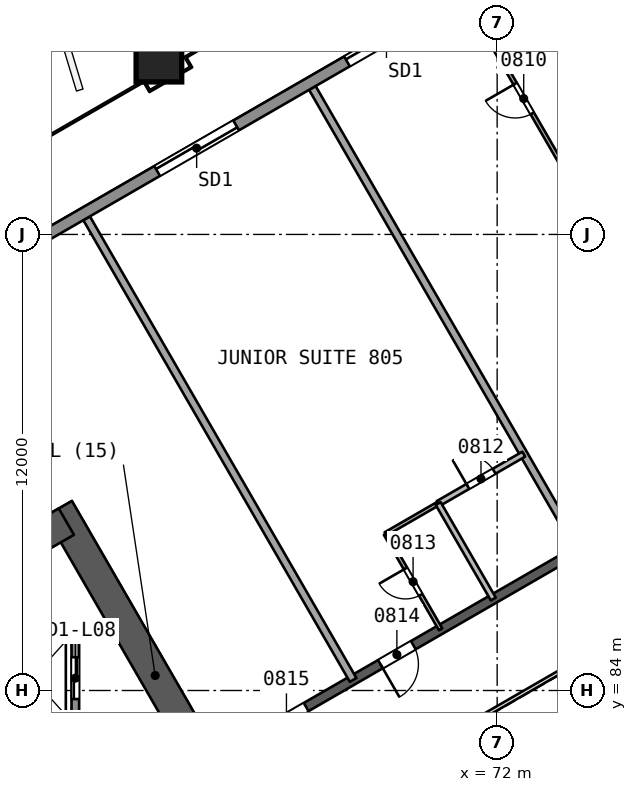
"""IFC4 building model, lengths in metres.
Left out: names, types, materials, properties, quantities, classifications, styles, units other than length and angle.
Written with IfcOpenShell. Run it as: python <this file> out.ifc"""

import sys

from ifc_helpers import new_model, si_unit, direction, frame, frame_2d, origin, origin_2d, place, context, subcontext, project, spatial, rectangle, extrude, element, fill, save


model = new_model("IFC4")
c1 = context("Model", 3, precision=1e-05, world=origin(), true_north=direction((0.0, 1.0)))
c2 = subcontext(c1, "Body", "Model", "MODEL_VIEW")
j1 = project(units=[si_unit("LENGTHUNIT", "METRE"), si_unit("PLANEANGLEUNIT", "RADIAN")], contexts=[c1])
p1 = place(None, origin())
s1 = spatial("IfcSite", under=j1, at=p1, CompositionType="ELEMENT")
p2 = place(p1, origin())
s2 = spatial("IfcBuilding", under=s1, at=p2, CompositionType="ELEMENT")
p3 = place(p2, frame((0.0, 0.0, 41.1)))
s3 = spatial("IfcBuildingStorey", under=s2, at=p3, CompositionType="ELEMENT", Elevation=41.1)
p4 = place(p3, frame((65.538, 80.0, 0.0), z_axis=(0.0, 0.0, 1.0), x_axis=(-0.49999662545, 0.866027352073, 0.0)))
e1 = element("IfcWall", 1, at=p4, inside=s3, PredefinedType="SHEAR", context=c2, shape_type="SweptSolid", body=[
    extrude(rectangle(XDim=10.149, YDim=0.8, at=frame_2d((5.074, 0.0))), origin(), (0.0, 0.0, 1.0), 3.7),
])
p5 = place(p4, frame((0.719, 0.0, 0.0)))
e2 = element("IfcOpeningElement", 2, at=p5, cuts=e1, PredefinedType="OPENING", context=c2, shape_type="SweptSolid", body=[
    extrude(rectangle(XDim=1.2, YDim=2.1, at=frame_2d((0.6, 1.05))), frame((0.0, 0.411, 0.0), z_axis=(0.0, -1.0, 0.0), x_axis=(1.0, 0.0, 0.0)), (0.0, 0.0, 1.0), 0.821),
])
p6 = place(p3, frame((60.664, 88.443, 0.0), z_axis=(0.0, 0.0, 1.0), x_axis=(-0.866029478545, -0.499992942241, 0.0)))
e3 = element("IfcWall", 3, at=p6, inside=s3, PredefinedType="SHEAR", context=c2, shape_type="SweptSolid", body=[
    extrude(rectangle(XDim=13.933, YDim=0.8, at=frame_2d((6.967, 0.0))), origin(), (0.0, 0.0, 1.0), 3.7),
])
p7 = place(p3, frame((78.2, 90.046, 0.0), z_axis=(0.0, 0.0, 1.0), x_axis=(-0.866026492143, -0.499998114903, 0.0)))
e4 = element("IfcWall", 4, at=p7, inside=s3, PredefinedType="SHEAR", context=c2, shape_type="SweptSolid", body=[
    extrude(rectangle(XDim=15.588, YDim=0.25, at=frame_2d((7.794, 0.0))), origin(), (0.0, 0.0, 1.0), 3.2),
])
p8 = place(p7, frame((1.838, 0.0, 0.0)))
e5 = element("IfcOpeningElement", 5, at=p8, cuts=e4, PredefinedType="OPENING", context=c2, shape_type="SweptSolid", body=[
    extrude(rectangle(XDim=1.0, YDim=2.1, at=frame_2d((0.5, 1.05))), frame((0.0, 0.135, 0.0), z_axis=(0.0, -1.0, 0.0), x_axis=(1.0, 0.0, 0.0)), (0.0, 0.0, 1.0), 0.271),
])
p9 = place(p7, frame((9.706, 0.0, 0.0)))
e6 = element("IfcOpeningElement", 6, at=p9, cuts=e4, PredefinedType="OPENING", context=c2, shape_type="SweptSolid", body=[
    extrude(rectangle(XDim=1.0, YDim=2.1, at=frame_2d((0.5, 1.05))), frame((0.0, 0.135, 0.0), z_axis=(0.0, -1.0, 0.0), x_axis=(1.0, 0.0, 0.0)), (0.0, 0.0, 1.0), 0.271),
])
p10 = place(p7, frame((12.962, 0.0, 0.0)))
e7 = element("IfcOpeningElement", 7, at=p10, cuts=e4, PredefinedType="OPENING", context=c2, shape_type="SweptSolid", body=[
    extrude(rectangle(XDim=1.2, YDim=2.4, at=frame_2d((0.6, 1.2))), frame((0.0, 0.135, 0.0), z_axis=(0.0, -1.0, 0.0), x_axis=(1.0, 0.0, 0.0)), (0.0, 0.0, 1.0), 0.271),
])
p11 = place(p3, frame((63.087, 100.634, 0.0), z_axis=(0.010093620709, -0.017482414954, 0.999796221231), x_axis=(0.866020200589, 0.50000901209, 8.5616e-08)))
e8 = element("IfcColumn", 8, at=p11, inside=s3, PredefinedType="COLUMN", context=c2, shape_type="SweptSolid", body=[
    extrude(rectangle(XDim=1.2, YDim=1.2, at=origin_2d()), origin(), (0.0, 0.0, 1.0), 3.701),
])
p12 = place(p3, frame((74.21, 96.956, 0.0), z_axis=(0.0, 0.0, 1.0), x_axis=(-0.499985689571, 0.866033665757, 0.0)))
e9 = element("IfcWall", 9, at=p12, inside=s3, PredefinedType="PARTITIONING", context=c2, shape_type="SweptSolid", body=[
    extrude(rectangle(XDim=6.048, YDim=0.1, at=frame_2d((3.024, 0.0))), origin(), (0.0, 0.0, 1.0), 3.2),
])
p13 = place(p12, frame((2.574, 0.0, 0.0)))
e10 = element("IfcOpeningElement", 10, at=p13, cuts=e9, PredefinedType="OPENING", context=c2, shape_type="SweptSolid", body=[
    extrude(rectangle(XDim=0.9, YDim=2.1, at=frame_2d((0.45, 1.05))), frame((0.0, 0.061, 0.0), z_axis=(0.0, -1.0, 0.0), x_axis=(1.0, 0.0, 0.0)), (0.0, 0.0, 1.0), 0.121),
])
p14 = place(p3, frame((67.136, 99.855, 0.0), z_axis=(0.0, 0.0, 1.0), x_axis=(0.499997162821, -0.866027041824, 0.0)))
e11 = element("IfcWall", 11, at=p14, inside=s3, PredefinedType="PARTITIONING", context=c2, shape_type="SweptSolid", body=[
    extrude(rectangle(XDim=14.027, YDim=0.2, at=frame_2d((7.013, 0.0))), origin(), (0.0, 0.0, 1.0), 3.2),
])
p15 = place(p3, frame((70.448, 88.919, 0.0), z_axis=(0.0, 0.0, 1.0), x_axis=(0.866062058628, 0.499936506574, 0.0)))
e12 = element("IfcWall", 12, at=p15, inside=s3, PredefinedType="PARTITIONING", context=c2, shape_type="SweptSolid", body=[
    extrude(rectangle(XDim=2.6, YDim=0.15, at=frame_2d((1.3, 0.0))), origin(), (0.0, 0.0, 1.0), 3.2),
])
p16 = place(p15, frame((0.9, 0.0, 0.0)))
e13 = element("IfcOpeningElement", 13, at=p16, cuts=e12, PredefinedType="OPENING", context=c2, shape_type="SweptSolid", body=[
    extrude(rectangle(XDim=0.8, YDim=2.1, at=frame_2d((0.4, 1.05))), frame((0.0, 0.085, 0.0), z_axis=(0.0, -1.0, 0.0), x_axis=(1.0, 0.0, 0.0)), (0.0, 0.0, 1.0), 0.171),
])
p17 = place(p3, frame((70.513, 85.608, 0.0), z_axis=(0.0, 0.0, 1.0), x_axis=(-0.499987231761, 0.866032775405, 0.0)))
e14 = element("IfcWall", 14, at=p17, inside=s3, PredefinedType="PARTITIONING", context=c2, shape_type="SweptSolid", body=[
    extrude(rectangle(XDim=2.9, YDim=0.1, at=frame_2d((1.45, 0.0))), origin(), (0.0, 0.0, 1.0), 3.2),
])
p18 = place(p17, frame((1.05, 0.0, 0.0)))
e15 = element("IfcOpeningElement", 15, at=p18, cuts=e14, PredefinedType="OPENING", context=c2, shape_type="SweptSolid", body=[
    extrude(rectangle(XDim=0.8, YDim=2.1, at=frame_2d((0.4, 1.05))), frame((0.0, 0.061, 0.0), z_axis=(0.0, -1.0, 0.0), x_axis=(1.0, 0.0, 0.0)), (0.0, 0.0, 1.0), 0.121),
])
p19 = place(p3, frame((69.063, 88.119, 0.0), z_axis=(0.0, 0.0, 1.0), x_axis=(0.865989903783, 0.500061482766, 0.0)))
e16 = element("IfcWall", 16, at=p19, inside=s3, PredefinedType="PARTITIONING", context=c2, shape_type="SweptSolid", body=[
    extrude(rectangle(XDim=1.6, YDim=0.1, at=frame_2d((0.8, 0.0))), origin(), (0.0, 0.0, 1.0), 3.2),
])
p20 = place(p3, frame((61.197, 96.426, 0.0), z_axis=(0.0, 0.0, 1.0), x_axis=(0.499997162821, -0.866027041824, 0.0)))
e17 = element("IfcWall", 17, at=p20, inside=s3, PredefinedType="PARTITIONING", context=c2, shape_type="SweptSolid", body=[
    extrude(rectangle(XDim=14.027, YDim=0.2, at=frame_2d((7.013, 0.0))), origin(), (0.0, 0.0, 1.0), 3.2),
])
p21 = place(p3, frame((70.448, 88.919, 0.0), z_axis=(0.0, 0.0, 1.0), x_axis=(0.50005036918, -0.865996321171, 0.0)))
e18 = element("IfcWall", 18, at=p21, inside=s3, PredefinedType="PARTITIONING", context=c2, shape_type="SweptSolid", body=[
    extrude(rectangle(XDim=2.9, YDim=0.15, at=frame_2d((1.45, 0.0))), origin(), (0.0, 0.0, 1.0), 3.2),
])
p22 = place(p3, frame((37.87, 83.13, 0.0), z_axis=(0.0, 0.0, 1.0), x_axis=(0.866026630825, 0.499997874697, 0.0)))
e19 = element("IfcWall", 19, at=p22, inside=s3, PredefinedType="SOLIDWALL", context=c2, shape_type="SweptSolid", body=[
    extrude(rectangle(XDim=61.18, YDim=0.3, at=frame_2d((30.59, 0.0))), origin(), (0.0, 0.0, 1.0), 3.2),
])
p23 = place(p22, frame((12.181, 0.0, 0.0)))
e20 = element("IfcOpeningElement", 20, at=p23, cuts=e19, PredefinedType="OPENING", context=c2, shape_type="SweptSolid", body=[
    extrude(rectangle(XDim=2.4, YDim=2.4, at=frame_2d((1.2, 1.2))), frame((0.0, 0.161, 0.0), z_axis=(0.0, -1.0, 0.0), x_axis=(1.0, 0.0, 0.0)), (0.0, 0.0, 1.0), 0.321),
])
p24 = place(p22, frame((34.846, 0.0, 0.0)))
e21 = element("IfcOpeningElement", 21, at=p24, cuts=e19, PredefinedType="OPENING", context=c2, shape_type="SweptSolid", body=[
    extrude(rectangle(XDim=2.4, YDim=2.4, at=frame_2d((1.2, 1.2))), frame((0.0, 0.161, 0.0), z_axis=(0.0, -1.0, 0.0), x_axis=(1.0, 0.0, 0.0)), (0.0, 0.0, 1.0), 0.321),
])
p25 = place(p22, frame((47.439, 0.0, 0.0)))
e22 = element("IfcOpeningElement", 22, at=p25, cuts=e19, PredefinedType="OPENING", context=c2, shape_type="SweptSolid", body=[
    extrude(rectangle(XDim=2.4, YDim=2.4, at=frame_2d((1.2, 1.2))), frame((0.0, 0.161, 0.0), z_axis=(0.0, -1.0, 0.0), x_axis=(1.0, 0.0, 0.0)), (0.0, 0.0, 1.0), 0.321),
])
p26 = place(p22, frame((29.078, 0.0, 0.0)))
e23 = element("IfcOpeningElement", 23, at=p26, cuts=e19, PredefinedType="OPENING", context=c2, shape_type="SweptSolid", body=[
    extrude(rectangle(XDim=2.4, YDim=2.4, at=frame_2d((1.2, 1.2))), frame((0.0, 0.161, 0.0), z_axis=(0.0, -1.0, 0.0), x_axis=(1.0, 0.0, 0.0)), (0.0, 0.0, 1.0), 0.321),
])
p27 = place(p3, frame((60.9, 85.45, 0.0), z_axis=(0.0, 0.0, 1.0), x_axis=(-1.0, 0.0, 0.0)))
e24 = element("IfcWall", 24, at=p27, inside=s3, PredefinedType="SOLIDWALL", context=c2, shape_type="SweptSolid", body=[
    extrude(rectangle(XDim=2.48, YDim=0.2, at=frame_2d((1.24, 0.0))), origin(), (0.0, 0.0, 1.0), 3.2),
])
p28 = place(p3, frame((60.9, 85.45, 0.0), z_axis=(0.0, 0.0, 1.0), x_axis=(0.0, -1.0, 0.0)))
e25 = element("IfcWall", 25, at=p28, inside=s3, PredefinedType="SOLIDWALL", context=c2, shape_type="SweptSolid", body=[
    extrude(rectangle(XDim=10.9, YDim=0.2, at=frame_2d((5.45, 0.0))), origin(), (0.0, 0.0, 1.0), 3.2),
])
p29 = place(p28, frame((0.575, 0.0, 0.0)))
e26 = element("IfcOpeningElement", 26, at=p29, cuts=e25, PredefinedType="OPENING", context=c2, shape_type="SweptSolid", body=[
    extrude(rectangle(XDim=1.1, YDim=2.1, at=frame_2d((0.55, 1.05))), frame((0.0, 0.11, 0.0), z_axis=(0.0, -1.0, 0.0), x_axis=(1.0, 0.0, 0.0)), (0.0, 0.0, 1.0), 0.221),
])
p30 = place(p28, frame((2.825, 0.0, 0.0)))
e27 = element("IfcOpeningElement", 27, at=p30, cuts=e25, PredefinedType="OPENING", context=c2, shape_type="SweptSolid", body=[
    extrude(rectangle(XDim=1.1, YDim=2.1, at=frame_2d((0.55, 1.05))), frame((0.0, 0.11, 0.0), z_axis=(0.0, -1.0, 0.0), x_axis=(1.0, 0.0, 0.0)), (0.0, 0.0, 1.0), 0.221),
])
p31 = place(p28, frame((5.075, 0.0, 0.0)))
e28 = element("IfcOpeningElement", 28, at=p31, cuts=e25, PredefinedType="OPENING", context=c2, shape_type="SweptSolid", body=[
    extrude(rectangle(XDim=1.1, YDim=2.1, at=frame_2d((0.55, 1.05))), frame((0.0, 0.11, 0.0), z_axis=(0.0, -1.0, 0.0), x_axis=(1.0, 0.0, 0.0)), (0.0, 0.0, 1.0), 0.221),
])
p32 = place(p28, frame((7.325, 0.0, 0.0)))
e29 = element("IfcOpeningElement", 29, at=p32, cuts=e25, PredefinedType="OPENING", context=c2, shape_type="SweptSolid", body=[
    extrude(rectangle(XDim=1.1, YDim=2.1, at=frame_2d((0.55, 1.05))), frame((0.0, 0.11, 0.0), z_axis=(0.0, -1.0, 0.0), x_axis=(1.0, 0.0, 0.0)), (0.0, 0.0, 1.0), 0.221),
])
p33 = place(p3, frame((77.738, 86.846, 0.0), z_axis=(0.0, 0.0, 1.0), x_axis=(-0.866026658274, -0.499997827154, 0.0)))
e30 = element("IfcWall", 30, at=p33, inside=s3, PredefinedType="PARTITIONING", context=c2, shape_type="SweptSolid", body=[
    extrude(rectangle(XDim=11.588, YDim=0.1, at=frame_2d((5.794, 0.0))), origin(), (0.0, 0.0, 1.0), 3.2),
])
p34 = place(p13, origin())
e31 = element("IfcDoor", 31, at=p34, inside=s3, OperationType="SINGLE_SWING_RIGHT", PredefinedType="NOTDEFINED", context=c2, shape_type="SweptSolid", body=[
    extrude(rectangle(XDim=0.9, YDim=2.1, at=frame_2d((0.45, 1.05))), frame((0.0, 0.025, 0.0), z_axis=(0.0, -1.0, 0.0), x_axis=(1.0, 0.0, 0.0)), (0.0, 0.0, 1.0), 0.05),
])
fill(e10, e31)
p35 = place(p16, origin())
e32 = element("IfcDoor", 32, at=p35, inside=s3, OperationType="SINGLE_SWING_LEFT", PredefinedType="NOTDEFINED", context=c2, shape_type="SweptSolid", body=[
    extrude(rectangle(XDim=0.8, YDim=2.1, at=frame_2d((0.4, 1.05))), frame((0.0, 0.025, 0.0), z_axis=(0.0, -1.0, 0.0), x_axis=(1.0, 0.0, 0.0)), (0.0, 0.0, 1.0), 0.05),
])
fill(e13, e32)
p36 = place(p18, origin())
e33 = element("IfcDoor", 33, at=p36, inside=s3, OperationType="SINGLE_SWING_RIGHT", PredefinedType="NOTDEFINED", context=c2, shape_type="SweptSolid", body=[
    extrude(rectangle(XDim=0.8, YDim=2.1, at=frame_2d((0.4, 1.05))), frame((0.0, 0.025, 0.0), z_axis=(0.0, -1.0, 0.0), x_axis=(1.0, 0.0, 0.0)), (0.0, 0.0, 1.0), 0.05),
])
fill(e15, e33)
p37 = place(p9, origin())
e34 = element("IfcDoor", 34, at=p37, inside=s3, OperationType="SINGLE_SWING_RIGHT", PredefinedType="NOTDEFINED", context=c2, shape_type="SweptSolid", body=[
    extrude(rectangle(XDim=1.0, YDim=2.1, at=frame_2d((0.5, 1.05))), frame((0.0, 0.025, 0.0), z_axis=(0.0, -1.0, 0.0), x_axis=(1.0, 0.0, 0.0)), (0.0, 0.0, 1.0), 0.05),
])
fill(e6, e34)
p38 = place(p10, origin())
e35 = element("IfcDoor", 35, at=p38, inside=s3, OperationType="SINGLE_SWING_RIGHT", PredefinedType="NOTDEFINED", context=c2, shape_type="SweptSolid", body=[
    extrude(rectangle(XDim=1.2, YDim=2.4, at=frame_2d((0.6, 1.2))), frame((0.0, 0.025, 0.0), z_axis=(0.0, -1.0, 0.0), x_axis=(1.0, 0.0, 0.0)), (0.0, 0.0, 1.0), 0.05),
])
fill(e7, e35)
p39 = place(p24, origin())
e36 = element("IfcDoor", 36, at=p39, inside=s3, OperationType="SLIDING_TO_RIGHT", PredefinedType="NOTDEFINED", context=c2, shape_type="SweptSolid", body=[
    extrude(rectangle(XDim=2.4, YDim=2.4, at=frame_2d((1.2, 1.2))), frame((0.0, 0.025, 0.0), z_axis=(0.0, -1.0, 0.0), x_axis=(1.0, 0.0, 0.0)), (0.0, 0.0, 1.0), 0.05),
])
fill(e21, e36)
p40 = place(p26, origin())
e37 = element("IfcDoor", 37, at=p40, inside=s3, OperationType="SLIDING_TO_RIGHT", PredefinedType="NOTDEFINED", context=c2, shape_type="SweptSolid", body=[
    extrude(rectangle(XDim=2.4, YDim=2.4, at=frame_2d((1.2, 1.2))), frame((0.0, 0.025, 0.0), z_axis=(0.0, -1.0, 0.0), x_axis=(1.0, 0.0, 0.0)), (0.0, 0.0, 1.0), 0.05),
])
fill(e23, e37)
p41 = place(p29, origin())
e38 = element("IfcDoor", 38, at=p41, inside=s3, OperationType="SLIDING_TO_RIGHT", PredefinedType="NOTDEFINED", context=c2, shape_type="SweptSolid", body=[
    extrude(rectangle(XDim=1.1, YDim=2.1, at=frame_2d((0.55, 1.05))), frame((0.0, 0.025, 0.0), z_axis=(0.0, -1.0, 0.0), x_axis=(1.0, 0.0, 0.0)), (0.0, 0.0, 1.0), 0.05),
])
fill(e26, e38)
save(model, sys.argv[1])
